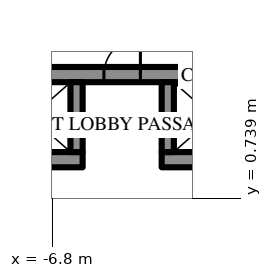
"""IFC4 building model, lengths in metres.
Left out: names, types, materials, properties, quantities, classifications, styles, units other than length and angle.
Written with IfcOpenShell. Run it as: python <this file> out.ifc"""

import sys

from ifc_helpers import new_model, si_unit, direction, frame, frame_2d, origin, place, context, subcontext, project, spatial, rectangle, extrude, element, fill, save


model = new_model("IFC4")
c1 = context("Model", 3, precision=1e-05, world=origin(), true_north=direction((0.0, 1.0)))
c2 = subcontext(c1, "Body", "Model", "MODEL_VIEW")
j1 = project(units=[si_unit("LENGTHUNIT", "METRE"), si_unit("PLANEANGLEUNIT", "RADIAN")], contexts=[c1])
p1 = place(None, origin())
s1 = spatial("IfcSite", under=j1, at=p1, CompositionType="ELEMENT")
p2 = place(p1, origin())
s2 = spatial("IfcBuilding", under=s1, at=p2, CompositionType="ELEMENT")
p3 = place(p2, origin())
s3 = spatial("IfcBuildingStorey", under=s2, at=p3, CompositionType="ELEMENT", Elevation=0.0)
p4 = place(p3, frame((-11.7, 2.0, 0.0), z_axis=(0.0, 0.0, 1.0), x_axis=(1.0, 0.0, 0.0)))
e1 = element("IfcWall", 1, at=p4, inside=s3, PredefinedType="SHEAR", context=c2, shape_type="SweptSolid", body=[
    extrude(rectangle(XDim=5.9, YDim=0.5, at=frame_2d((2.95, 0.0))), origin(), (0.0, 0.0, 1.0), 7.0),
])
p5 = place(p4, frame((0.6, 0.0, 0.0)))
e2 = element("IfcOpeningElement", 2, at=p5, cuts=e1, PredefinedType="OPENING", context=c2, shape_type="SweptSolid", body=[
    extrude(rectangle(XDim=1.2, YDim=2.2, at=frame_2d((0.6, 1.1))), frame((0.0, 0.26, 0.0), z_axis=(0.0, -1.0, 0.0), x_axis=(1.0, 0.0, 0.0)), (0.0, 0.0, 1.0), 0.52),
])
p6 = place(p3, frame((-3.2, 2.0, 0.0), z_axis=(0.0, 0.0, 1.0), x_axis=(1.0, 0.0, 0.0)))
e3 = element("IfcWall", 3, at=p6, inside=s3, PredefinedType="SHEAR", context=c2, shape_type="SweptSolid", body=[
    extrude(rectangle(XDim=14.9, YDim=0.5, at=frame_2d((7.45, 0.0))), origin(), (0.0, 0.0, 1.0), 7.0),
])
p7 = place(p6, frame((1.15, 0.0, 0.0)))
e4 = element("IfcOpeningElement", 4, at=p7, cuts=e3, PredefinedType="OPENING", context=c2, shape_type="SweptSolid", body=[
    extrude(rectangle(XDim=1.1, YDim=2.2, at=frame_2d((0.55, 1.1))), frame((0.0, 0.26, 0.0), z_axis=(0.0, -1.0, 0.0), x_axis=(1.0, 0.0, 0.0)), (0.0, 0.0, 1.0), 0.52),
])
p8 = place(p6, frame((4.15, 0.0, 0.0)))
e5 = element("IfcOpeningElement", 5, at=p8, cuts=e3, PredefinedType="OPENING", context=c2, shape_type="SweptSolid", body=[
    extrude(rectangle(XDim=1.1, YDim=2.2, at=frame_2d((0.55, 1.1))), frame((0.0, 0.26, 0.0), z_axis=(0.0, -1.0, 0.0), x_axis=(1.0, 0.0, 0.0)), (0.0, 0.0, 1.0), 0.52),
])
p9 = place(p6, frame((7.15, 0.0, 0.0)))
e6 = element("IfcOpeningElement", 6, at=p9, cuts=e3, PredefinedType="OPENING", context=c2, shape_type="SweptSolid", body=[
    extrude(rectangle(XDim=1.1, YDim=2.2, at=frame_2d((0.55, 1.1))), frame((0.0, 0.26, 0.0), z_axis=(0.0, -1.0, 0.0), x_axis=(1.0, 0.0, 0.0)), (0.0, 0.0, 1.0), 0.52),
])
p10 = place(p6, frame((10.15, 0.0, 0.0)))
e7 = element("IfcOpeningElement", 7, at=p10, cuts=e3, PredefinedType="OPENING", context=c2, shape_type="SweptSolid", body=[
    extrude(rectangle(XDim=1.1, YDim=2.2, at=frame_2d((0.55, 1.1))), frame((0.0, 0.26, 0.0), z_axis=(0.0, -1.0, 0.0), x_axis=(1.0, 0.0, 0.0)), (0.0, 0.0, 1.0), 0.52),
])
p11 = place(p6, frame((13.1, 0.0, 0.0)))
e8 = element("IfcOpeningElement", 8, at=p11, cuts=e3, PredefinedType="OPENING", context=c2, shape_type="SweptSolid", body=[
    extrude(rectangle(XDim=1.2, YDim=2.2, at=frame_2d((0.6, 1.1))), frame((0.0, 0.26, 0.0), z_axis=(0.0, -1.0, 0.0), x_axis=(1.0, 0.0, 0.0)), (0.0, 0.0, 1.0), 0.52),
])
p12 = place(p3, frame((-11.7, 4.8, 0.0), z_axis=(0.0, 0.0, 1.0), x_axis=(1.0, 0.0, 0.0)))
e9 = element("IfcWall", 9, at=p12, inside=s3, PredefinedType="SHEAR", context=c2, shape_type="SweptSolid", body=[
    extrude(rectangle(XDim=23.4, YDim=0.5, at=frame_2d((11.7, 0.0))), origin(), (0.0, 0.0, 1.0), 7.0),
])
p13 = place(p12, frame((6.6, 0.0, 0.0)))
e10 = element("IfcOpeningElement", 10, at=p13, cuts=e9, PredefinedType="OPENING", context=c2, shape_type="SweptSolid", body=[
    extrude(rectangle(XDim=1.2, YDim=2.2, at=frame_2d((0.6, 1.1))), frame((0.0, 0.26, 0.0), z_axis=(0.0, -1.0, 0.0), x_axis=(1.0, 0.0, 0.0)), (0.0, 0.0, 1.0), 0.52),
])
p14 = place(p12, frame((3.6, 0.0, 0.0)))
e11 = element("IfcOpeningElement", 11, at=p14, cuts=e9, PredefinedType="OPENING", context=c2, shape_type="SweptSolid", body=[
    extrude(rectangle(XDim=1.2, YDim=2.2, at=frame_2d((0.6, 1.1))), frame((0.0, 0.26, 0.0), z_axis=(0.0, -1.0, 0.0), x_axis=(1.0, 0.0, 0.0)), (0.0, 0.0, 1.0), 0.52),
])
for number, where, z_axis, x_axis in (
    (12, (-6.0, 2.25, 0.0), (0.0, 0.0, 1.0), (0.0, 1.0, 0.0)),
    (13, (-3.0, 2.25, 0.0), (0.0, 0.0, 1.0), (0.0, 1.0, 0.0)),
):
    element("IfcWall", number, at=place(p3, frame(where, z_axis=z_axis, x_axis=x_axis)), inside=s3, PredefinedType="SHEAR", context=c2, shape_type="SweptSolid", body=[
        extrude(rectangle(XDim=2.3, YDim=0.4, at=frame_2d((1.15, 0.0))), origin(), (0.0, 0.0, 1.0), 7.0),
    ])
p15 = place(p13, origin())
e14 = element("IfcDoor", 14, at=p15, inside=s3, OperationType="SINGLE_SWING_LEFT", PredefinedType="DOOR", context=c2, shape_type="SweptSolid", body=[
    extrude(rectangle(XDim=1.2, YDim=2.2, at=frame_2d((0.6, 1.1))), frame((0.0, 0.025, 0.0), z_axis=(0.0, -1.0, 0.0), x_axis=(1.0, 0.0, 0.0)), (0.0, 0.0, 1.0), 0.05),
])
fill(e10, e14)
save(model, sys.argv[1])
